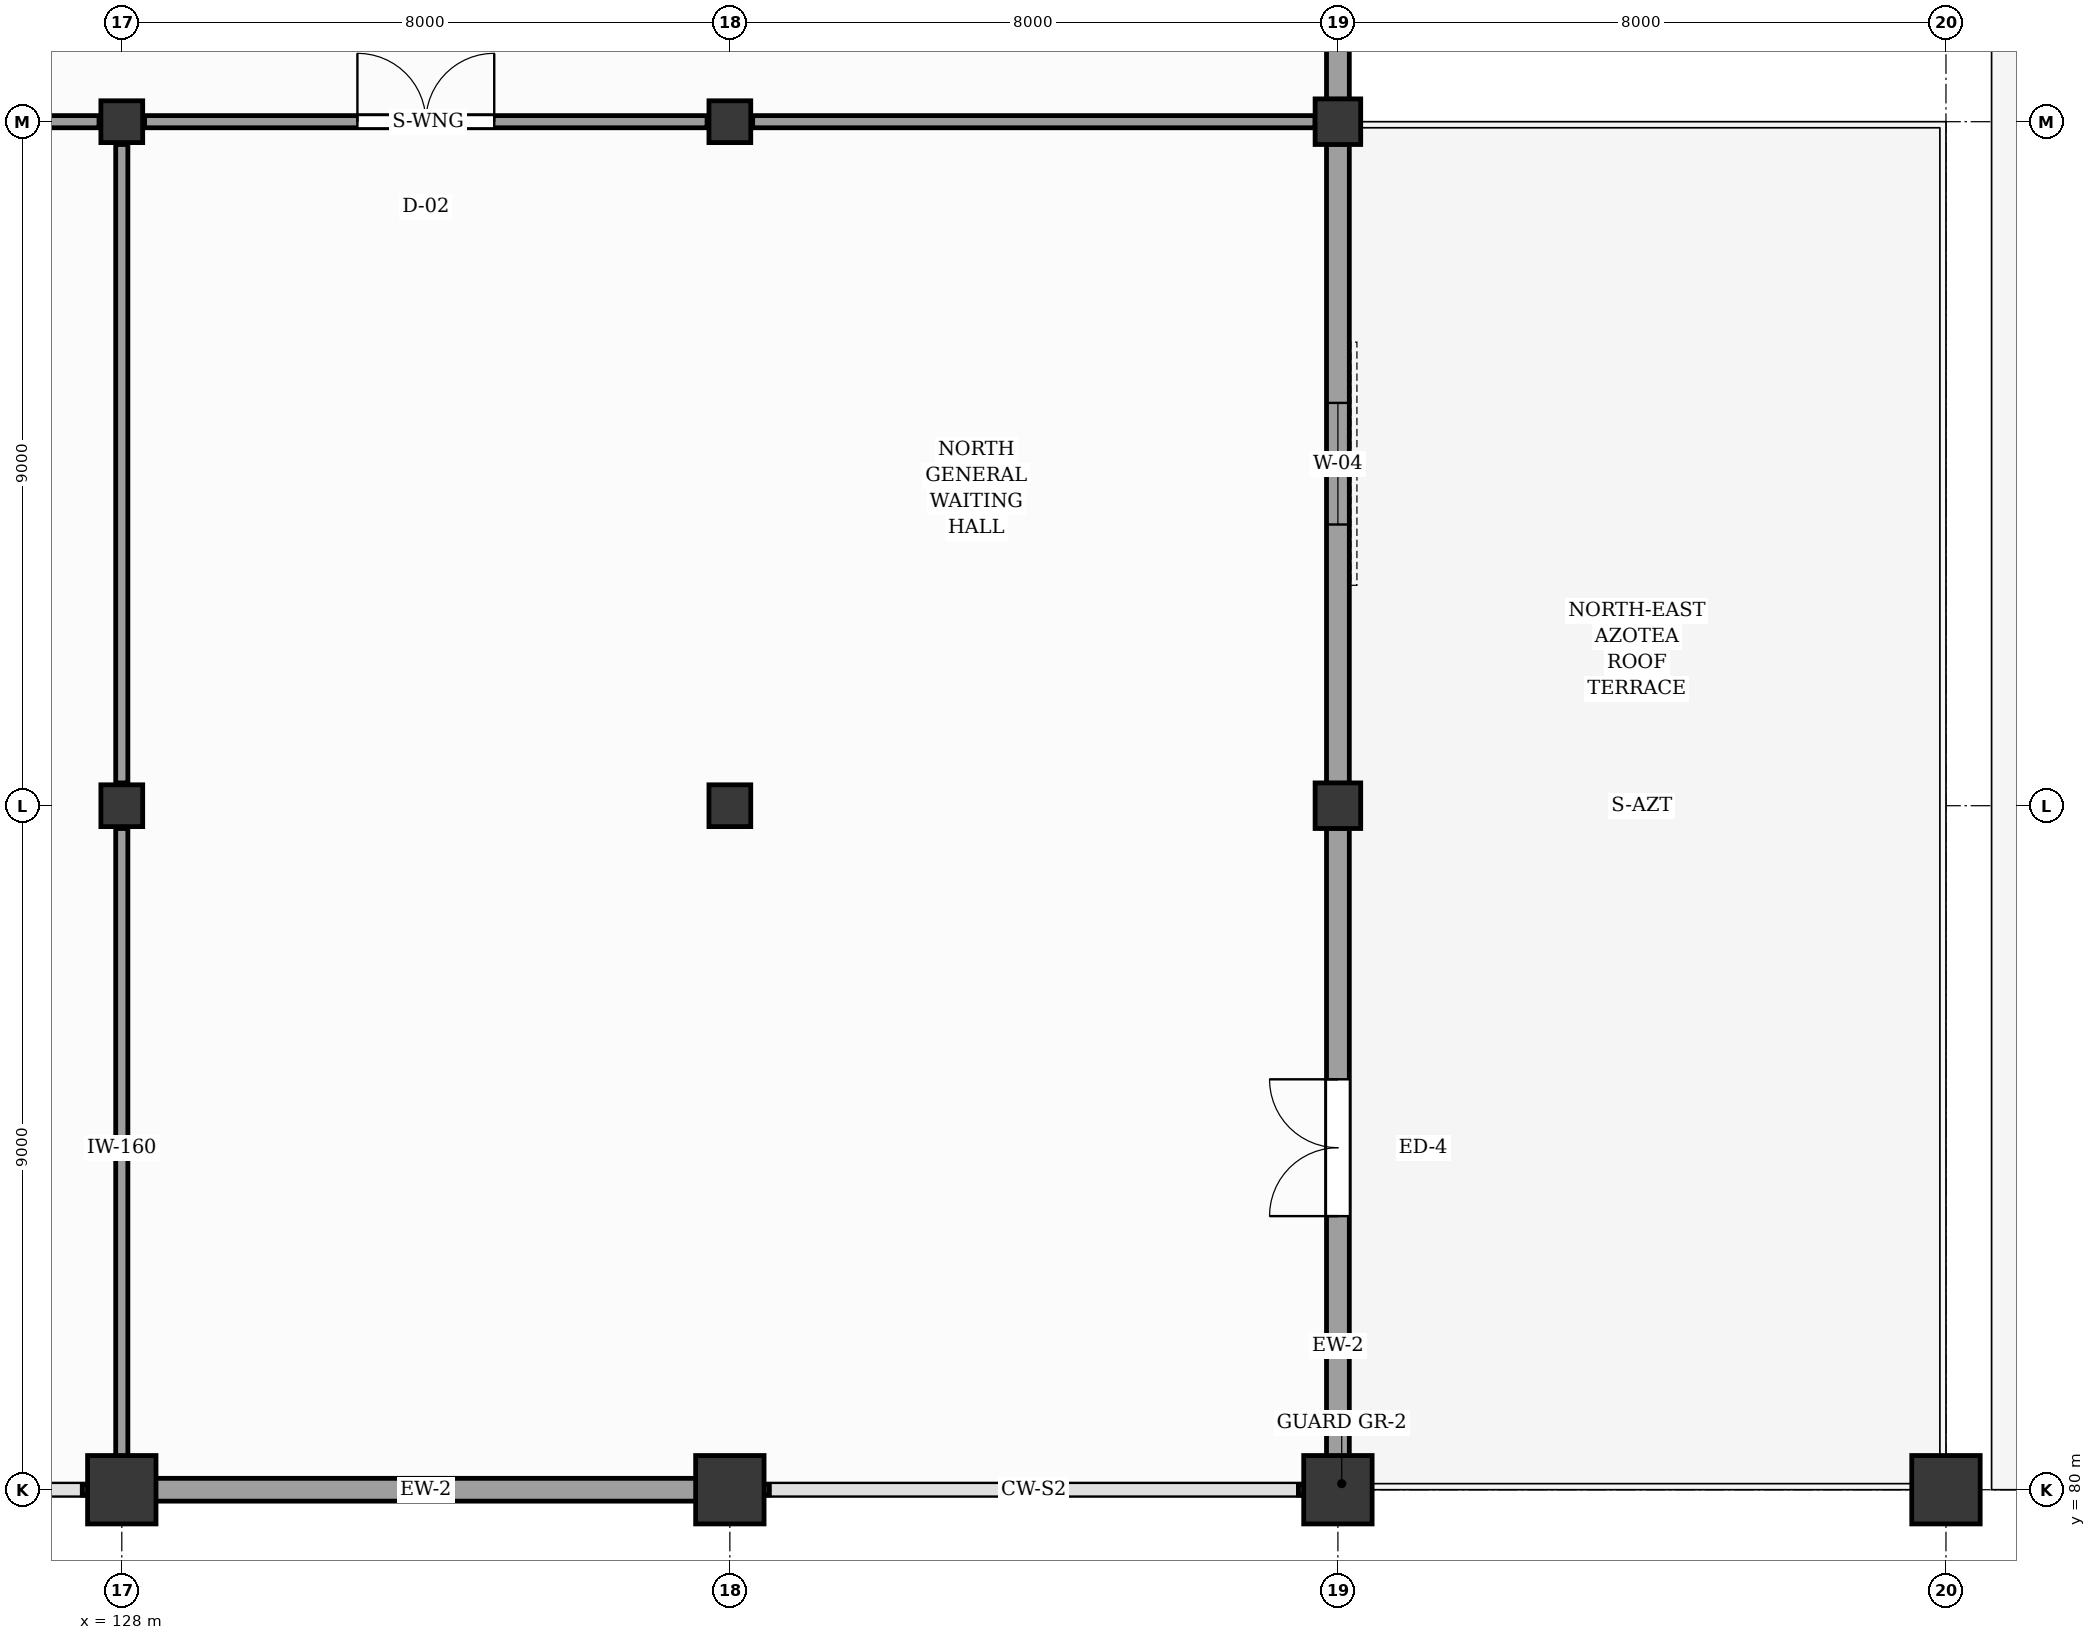
"""IFC4 building model, lengths in metres.
Left out: names, types, materials, properties, quantities, classifications, styles, units other than length and angle.
Written with IfcOpenShell. Run it as: python <this file> out.ifc"""

import sys

from ifc_helpers import new_model, si_unit, direction, frame, frame_2d, origin, origin_2d, place, context, subcontext, project, spatial, rectangle, extrude, element, fill, save


model = new_model("IFC4")
c1 = context("Model", 3, precision=1e-05, world=origin(), true_north=direction((0.0, 1.0)))
c2 = subcontext(c1, "Body", "Model", "MODEL_VIEW")
j1 = project(units=[si_unit("LENGTHUNIT", "METRE"), si_unit("PLANEANGLEUNIT", "RADIAN")], contexts=[c1])
p1 = place(None, origin())
s1 = spatial("IfcSite", under=j1, at=p1, CompositionType="ELEMENT")
p2 = place(p1, origin())
s2 = spatial("IfcBuilding", under=s1, at=p2, CompositionType="ELEMENT")
p3 = place(p2, frame((0.0, 0.0, 9.6)))
s3 = spatial("IfcBuildingStorey", under=s2, at=p3, CompositionType="ELEMENT", Elevation=9.6)
p4 = place(p3, frame((128.0, 80.0, 0.0), z_axis=(0.0, 0.0, 1.0), x_axis=(1.0, 0.0, 0.0)))
e1 = element("IfcColumn", 1, at=p4, inside=s3, PredefinedType="COLUMN", context=c2, shape_type="SweptSolid", body=[
    extrude(rectangle(XDim=0.9, YDim=0.9, at=origin_2d()), origin(), (0.0, 0.0, 1.0), 6.6),
])
for number, where, z_axis, x_axis in (
    (2, (128.0, 89.0, 0.0), (0.0, 0.0, 1.0), (1.0, 0.0, 0.0)),
    (3, (128.0, 98.0, 0.0), (0.0, 0.0, 1.0), (1.0, 0.0, 0.0)),
):
    element("IfcColumn", number, at=place(p3, frame(where, z_axis=z_axis, x_axis=x_axis)), inside=s3, PredefinedType="COLUMN", context=c2, shape_type="SweptSolid", body=[
        extrude(rectangle(XDim=0.55, YDim=0.55, at=origin_2d()), origin(), (0.0, 0.0, 1.0), 6.6),
    ])
p5 = place(p3, frame((136.0, 80.0, 0.0), z_axis=(0.0, 0.0, 1.0), x_axis=(1.0, 0.0, 0.0)))
e4 = element("IfcColumn", 4, at=p5, inside=s3, PredefinedType="COLUMN", context=c2, shape_type="SweptSolid", body=[
    extrude(rectangle(XDim=0.9, YDim=0.9, at=origin_2d()), origin(), (0.0, 0.0, 1.0), 6.6),
])
for number, where, z_axis, x_axis in (
    (5, (136.0, 89.0, 0.0), (0.0, 0.0, 1.0), (1.0, 0.0, 0.0)),
    (6, (136.0, 98.0, 0.0), (0.0, 0.0, 1.0), (1.0, 0.0, 0.0)),
):
    element("IfcColumn", number, at=place(p3, frame(where, z_axis=z_axis, x_axis=x_axis)), inside=s3, PredefinedType="COLUMN", context=c2, shape_type="SweptSolid", body=[
        extrude(rectangle(XDim=0.55, YDim=0.55, at=origin_2d()), origin(), (0.0, 0.0, 1.0), 6.6),
    ])
p6 = place(p3, frame((144.0, 80.0, 0.0), z_axis=(0.0, 0.0, 1.0), x_axis=(1.0, 0.0, 0.0)))
e7 = element("IfcColumn", 7, at=p6, inside=s3, PredefinedType="COLUMN", context=c2, shape_type="SweptSolid", body=[
    extrude(rectangle(XDim=0.9, YDim=0.9, at=origin_2d()), origin(), (0.0, 0.0, 1.0), 6.6),
])
for number, where, z_axis, x_axis in (
    (8, (144.0, 89.0, 0.0), (0.0, 0.0, 1.0), (1.0, 0.0, 0.0)),
    (9, (144.0, 98.0, 0.0), (0.0, 0.0, 1.0), (1.0, 0.0, 0.0)),
):
    element("IfcColumn", number, at=place(p3, frame(where, z_axis=z_axis, x_axis=x_axis)), inside=s3, PredefinedType="COLUMN", context=c2, shape_type="SweptSolid", body=[
        extrude(rectangle(XDim=0.6, YDim=0.6, at=origin_2d()), origin(), (0.0, 0.0, 1.0), 6.6),
    ])
p7 = place(p3, frame((152.0, 80.0, 0.0), z_axis=(0.0, 0.0, 1.0), x_axis=(1.0, 0.0, 0.0)))
e10 = element("IfcColumn", 10, at=p7, inside=s3, PredefinedType="COLUMN", context=c2, shape_type="SweptSolid", body=[
    extrude(rectangle(XDim=0.9, YDim=0.9, at=origin_2d()), origin(), (0.0, 0.0, 1.0), 6.6),
])
p8 = place(p3, frame((128.345, 80.0, 0.0), z_axis=(0.0, 0.0, 1.0), x_axis=(1.0, 0.0, 0.0)))
e11 = element("IfcWall", 11, at=p8, inside=s3, PredefinedType="SOLIDWALL", context=c2, shape_type="SweptSolid", body=[
    extrude(rectangle(XDim=7.31, YDim=0.3, at=frame_2d((3.655, 0.0))), origin(), (0.0, 0.0, 1.0), 4.12),
])
p9 = place(p3, frame((144.0, 80.4, 0.0), z_axis=(0.0, 0.0, 1.0), x_axis=(0.0, 1.0, 0.0)))
e12 = element("IfcWall", 12, at=p9, inside=s3, PredefinedType="SOLIDWALL", context=c2, shape_type="SweptSolid", body=[
    extrude(rectangle(XDim=8.305, YDim=0.3, at=frame_2d((4.153, 0.0))), origin(), (0.0, 0.0, 1.0), 5.36),
])
p10 = place(p9, frame((3.2, 0.0, 0.0)))
e13 = element("IfcOpeningElement", 13, at=p10, cuts=e12, PredefinedType="OPENING", context=c2, shape_type="SweptSolid", body=[
    extrude(rectangle(XDim=1.8, YDim=2.2, at=frame_2d((0.9, 1.1))), frame((0.0, 0.16, 0.0), z_axis=(0.0, -1.0, 0.0), x_axis=(1.0, 0.0, 0.0)), (0.0, 0.0, 1.0), 0.32),
])
p11 = place(p3, frame((144.0, 89.295, 0.0), z_axis=(0.0, 0.0, 1.0), x_axis=(0.0, 1.0, 0.0)))
e14 = element("IfcWall", 14, at=p11, inside=s3, PredefinedType="SOLIDWALL", context=c2, shape_type="SweptSolid", body=[
    extrude(rectangle(XDim=8.41, YDim=0.3, at=frame_2d((4.205, 0.0))), origin(), (0.0, 0.0, 1.0), 5.64),
])
p12 = place(p11, frame((3.405, 0.0, 0.95)))
e15 = element("IfcOpeningElement", 15, at=p12, cuts=e14, PredefinedType="OPENING", context=c2, shape_type="SweptSolid", body=[
    extrude(rectangle(XDim=1.6, YDim=2.1, at=frame_2d((0.8, 1.05))), frame((0.0, 0.16, 0.0), z_axis=(0.0, -1.0, 0.0), x_axis=(1.0, 0.0, 0.0)), (0.0, 0.0, 1.0), 0.32),
])
p13 = place(p3, frame((144.0, 98.295, 0.0), z_axis=(0.0, 0.0, 1.0), x_axis=(0.0, 1.0, 0.0)))
e16 = element("IfcWall", 16, at=p13, inside=s3, PredefinedType="SOLIDWALL", context=c2, shape_type="SweptSolid", body=[
    extrude(rectangle(XDim=8.41, YDim=0.3, at=frame_2d((4.205, 0.0))), origin(), (0.0, 0.0, 1.0), 5.64),
])
p14 = place(p13, frame((3.405, 0.0, 0.95)))
e17 = element("IfcOpeningElement", 17, at=p14, cuts=e16, PredefinedType="OPENING", context=c2, shape_type="SweptSolid", body=[
    extrude(rectangle(XDim=1.6, YDim=2.1, at=frame_2d((0.8, 1.05))), frame((0.0, 0.16, 0.0), z_axis=(0.0, -1.0, 0.0), x_axis=(1.0, 0.0, 0.0)), (0.0, 0.0, 1.0), 0.32),
])
p15 = place(p3, frame((120.3, 98.0, 0.0), z_axis=(0.0, 0.0, 1.0), x_axis=(1.0, 0.0, 0.0)))
e18 = element("IfcWall", 18, at=p15, inside=s3, PredefinedType="PARTITIONING", context=c2, shape_type="SweptSolid", body=[
    extrude(rectangle(XDim=7.4, YDim=0.16, at=frame_2d((3.7, 0.0))), origin(), (0.0, 0.0, 1.0), 4.83),
])
p16 = place(p15, frame((2.8, 0.0, 0.0)))
e19 = element("IfcOpeningElement", 19, at=p16, cuts=e18, PredefinedType="OPENING", context=c2, shape_type="SweptSolid", body=[
    extrude(rectangle(XDim=1.8, YDim=2.25, at=frame_2d((0.9, 1.125))), frame((0.0, 0.09, 0.0), z_axis=(0.0, -1.0, 0.0), x_axis=(1.0, 0.0, 0.0)), (0.0, 0.0, 1.0), 0.18),
])
p17 = place(p3, frame((128.0, 80.3, 0.0), z_axis=(0.0, 0.0, 1.0), x_axis=(0.0, 1.0, 0.0)))
e20 = element("IfcWall", 20, at=p17, inside=s3, PredefinedType="PARTITIONING", context=c2, shape_type="SweptSolid", body=[
    extrude(rectangle(XDim=8.4, YDim=0.16, at=frame_2d((4.2, 0.0))), origin(), (0.0, 0.0, 1.0), 5.36),
])
p18 = place(p3, frame((128.0, 89.3, 0.0), z_axis=(0.0, 0.0, 1.0), x_axis=(0.0, 1.0, 0.0)))
e21 = element("IfcWall", 21, at=p18, inside=s3, PredefinedType="PARTITIONING", context=c2, shape_type="SweptSolid", body=[
    extrude(rectangle(XDim=8.4, YDim=0.16, at=frame_2d((4.2, 0.0))), origin(), (0.0, 0.0, 1.0), 5.5),
])
p19 = place(p3, frame((128.3, 98.0, 0.0), z_axis=(0.0, 0.0, 1.0), x_axis=(1.0, 0.0, 0.0)))
e22 = element("IfcWall", 22, at=p19, inside=s3, PredefinedType="PARTITIONING", context=c2, shape_type="SweptSolid", body=[
    extrude(rectangle(XDim=7.4, YDim=0.16, at=frame_2d((3.7, 0.0))), origin(), (0.0, 0.0, 1.0), 5.5),
])
p20 = place(p19, frame((2.8, 0.0, 0.0)))
e23 = element("IfcOpeningElement", 23, at=p20, cuts=e22, PredefinedType="OPENING", context=c2, shape_type="SweptSolid", body=[
    extrude(rectangle(XDim=1.8, YDim=2.25, at=frame_2d((0.9, 1.125))), frame((0.0, 0.09, 0.0), z_axis=(0.0, -1.0, 0.0), x_axis=(1.0, 0.0, 0.0)), (0.0, 0.0, 1.0), 0.18),
])
p21 = place(p3, frame((136.3, 98.0, 0.0), z_axis=(0.0, 0.0, 1.0), x_axis=(1.0, 0.0, 0.0)))
e24 = element("IfcWall", 24, at=p21, inside=s3, PredefinedType="PARTITIONING", context=c2, shape_type="SweptSolid", body=[
    extrude(rectangle(XDim=7.4, YDim=0.16, at=frame_2d((3.7, 0.0))), origin(), (0.0, 0.0, 1.0), 5.5),
])
p22 = place(p10, origin())
e25 = element("IfcDoor", 25, at=p22, inside=s3, OperationType="DOUBLE_DOOR_SINGLE_SWING", PredefinedType="DOOR", context=c2, shape_type="SweptSolid", body=[
    extrude(rectangle(XDim=1.8, YDim=2.2, at=frame_2d((0.9, 1.1))), frame((0.0, 0.025, 0.0), z_axis=(0.0, -1.0, 0.0), x_axis=(1.0, 0.0, 0.0)), (0.0, 0.0, 1.0), 0.05),
])
fill(e13, e25)
p23 = place(p12, origin())
e26 = element("IfcWindow", 26, at=p23, inside=s3, PartitioningType="SINGLE_PANEL", PredefinedType="WINDOW", context=c2, shape_type="SweptSolid", body=[
    extrude(rectangle(XDim=1.6, YDim=2.1, at=frame_2d((0.8, 1.05))), frame((0.0, 0.03, 0.0), z_axis=(0.0, -1.0, 0.0), x_axis=(1.0, 0.0, 0.0)), (0.0, 0.0, 1.0), 0.06),
])
fill(e15, e26)
p24 = place(p20, origin())
e27 = element("IfcDoor", 27, at=p24, inside=s3, OperationType="DOUBLE_DOOR_SINGLE_SWING", PredefinedType="DOOR", context=c2, shape_type="SweptSolid", body=[
    extrude(rectangle(XDim=1.8, YDim=2.25, at=frame_2d((0.9, 1.125))), frame((0.0, 0.025, 0.0), z_axis=(0.0, -1.0, 0.0), x_axis=(1.0, 0.0, 0.0)), (0.0, 0.0, 1.0), 0.05),
])
fill(e23, e27)
save(model, sys.argv[1])
